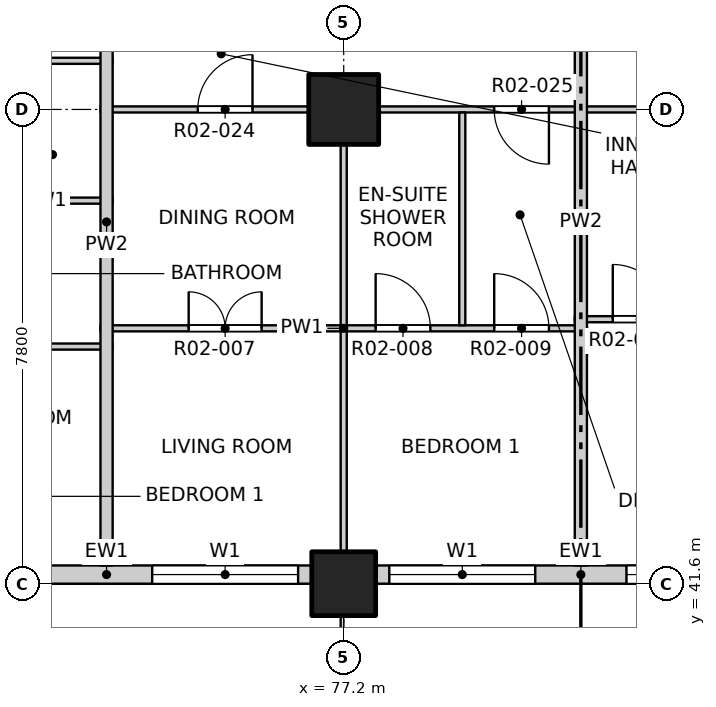
"""IFC4 building model, lengths in metres.
Left out: names, types, materials, properties, quantities, classifications, styles, units other than length and angle.
Written with IfcOpenShell. Run it as: python <this file> out.ifc"""

import sys

from ifc_helpers import new_model, si_unit, direction, frame, frame_2d, origin, origin_2d, place, context, subcontext, project, spatial, rectangle, extrude, element, fill, save


model = new_model("IFC4")
c1 = context("Model", 3, precision=1e-05, world=origin(), true_north=direction((0.0, 1.0)))
c2 = subcontext(c1, "Body", "Model", "MODEL_VIEW")
j1 = project(units=[si_unit("LENGTHUNIT", "METRE"), si_unit("PLANEANGLEUNIT", "RADIAN")], contexts=[c1])
p1 = place(None, origin())
s1 = spatial("IfcSite", under=j1, at=p1, CompositionType="ELEMENT")
p2 = place(p1, origin())
s2 = spatial("IfcBuilding", under=s1, at=p2, CompositionType="ELEMENT")
p3 = place(p2, frame((0.0, 0.0, 36.5)))
s3 = spatial("IfcBuildingStorey", under=s2, at=p3, CompositionType="ELEMENT", Elevation=36.5)
p4 = place(p3, frame((77.2, 41.6, -0.25), z_axis=(0.0, 0.0, 1.0), x_axis=(1.0, 0.0, 0.0)))
e1 = element("IfcColumn", 1, at=p4, inside=s3, PredefinedType="COLUMN", context=c2, shape_type="SweptSolid", body=[
    extrude(rectangle(XDim=1.05, YDim=1.05, at=origin_2d()), origin(), (0.0, 0.0, 1.0), 3.4),
])
p5 = place(p3, frame((77.2, 49.4, -0.25), z_axis=(0.0, 0.0, 1.0), x_axis=(1.0, 0.0, 0.0)))
e2 = element("IfcColumn", 2, at=p5, inside=s3, PredefinedType="COLUMN", context=c2, shape_type="SweptSolid", body=[
    extrude(rectangle(XDim=1.15, YDim=1.15, at=origin_2d()), origin(), (0.0, 0.0, 1.0), 3.4),
])
p6 = place(p3, frame((69.925, 41.75, 0.0), z_axis=(0.0, 0.0, 1.0), x_axis=(1.0, 0.0, 0.0)))
e3 = element("IfcWall", 3, at=p6, inside=s3, PredefinedType="SOLIDWALL", context=c2, shape_type="SweptSolid", body=[
    extrude(rectangle(XDim=6.75, YDim=0.3, at=frame_2d((3.375, 0.0))), origin(), (0.0, 0.0, 1.0), 2.7),
])
p7 = place(p6, frame((0.525, 0.0, 0.0)))
e4 = element("IfcOpeningElement", 4, at=p7, cuts=e3, PredefinedType="OPENING", context=c2, shape_type="SweptSolid", body=[
    extrude(rectangle(XDim=1.8, YDim=2.4, at=frame_2d((0.9, 1.2))), frame((0.0, 0.16, 0.0), z_axis=(0.0, -1.0, 0.0), x_axis=(1.0, 0.0, 0.0)), (0.0, 0.0, 1.0), 0.32),
])
p8 = place(p6, frame((4.125, 0.0, 0.9)))
e5 = element("IfcOpeningElement", 5, at=p8, cuts=e3, PredefinedType="OPENING", context=c2, shape_type="SweptSolid", body=[
    extrude(rectangle(XDim=2.4, YDim=1.8, at=frame_2d((1.2, 0.9))), frame((0.0, 0.16, 0.0), z_axis=(0.0, -1.0, 0.0), x_axis=(1.0, 0.0, 0.0)), (0.0, 0.0, 1.0), 0.32),
])
p9 = place(p3, frame((77.725, 41.75, 0.0), z_axis=(0.0, 0.0, 1.0), x_axis=(1.0, 0.0, 0.0)))
e6 = element("IfcWall", 6, at=p9, inside=s3, PredefinedType="SOLIDWALL", context=c2, shape_type="SweptSolid", body=[
    extrude(rectangle(XDim=6.75, YDim=0.3, at=frame_2d((3.375, 0.0))), origin(), (0.0, 0.0, 1.0), 2.7),
])
p10 = place(p9, frame((0.225, 0.0, 0.9)))
e7 = element("IfcOpeningElement", 7, at=p10, cuts=e6, PredefinedType="OPENING", context=c2, shape_type="SweptSolid", body=[
    extrude(rectangle(XDim=2.4, YDim=1.8, at=frame_2d((1.2, 0.9))), frame((0.0, 0.16, 0.0), z_axis=(0.0, -1.0, 0.0), x_axis=(1.0, 0.0, 0.0)), (0.0, 0.0, 1.0), 0.32),
])
p11 = place(p9, frame((4.125, 0.0, 0.9)))
e8 = element("IfcOpeningElement", 8, at=p11, cuts=e6, PredefinedType="OPENING", context=c2, shape_type="SweptSolid", body=[
    extrude(rectangle(XDim=2.4, YDim=1.8, at=frame_2d((1.2, 0.9))), frame((0.0, 0.16, 0.0), z_axis=(0.0, -1.0, 0.0), x_axis=(1.0, 0.0, 0.0)), (0.0, 0.0, 1.0), 0.32),
])
p12 = place(p3, frame((61.9, 45.5, 0.0), z_axis=(0.0, 0.0, 1.0), x_axis=(1.0, 0.0, 0.0)))
e9 = element("IfcWall", 9, at=p12, inside=s3, PredefinedType="PARTITIONING", context=c2, shape_type="SweptSolid", body=[
    extrude(rectangle(XDim=11.5, YDim=0.1, at=frame_2d((5.75, 0.0))), origin(), (0.0, 0.0, 1.0), 3.15),
])
p13 = place(p12, frame((7.965, 0.0, 0.0)))
e10 = element("IfcOpeningElement", 10, at=p13, cuts=e9, PredefinedType="OPENING", context=c2, shape_type="SweptSolid", body=[
    extrude(rectangle(XDim=0.9, YDim=2.1, at=frame_2d((0.45, 1.05))), frame((0.0, 0.06, 0.0), z_axis=(0.0, -1.0, 0.0), x_axis=(1.0, 0.0, 0.0)), (0.0, 0.0, 1.0), 0.12),
])
p14 = place(p3, frame((73.2, 45.8, 0.0), z_axis=(0.0, 0.0, 1.0), x_axis=(1.0, 0.0, 0.0)))
e11 = element("IfcWall", 11, at=p14, inside=s3, PredefinedType="PARTITIONING", context=c2, shape_type="SweptSolid", body=[
    extrude(rectangle(XDim=8.0, YDim=0.1, at=frame_2d((4.0, 0.0))), origin(), (0.0, 0.0, 1.0), 3.15),
])
p15 = place(p14, frame((1.45, 0.0, 0.0)))
e12 = element("IfcOpeningElement", 12, at=p15, cuts=e11, PredefinedType="OPENING", context=c2, shape_type="SweptSolid", body=[
    extrude(rectangle(XDim=1.2, YDim=2.1, at=frame_2d((0.6, 1.05))), frame((0.0, 0.06, 0.0), z_axis=(0.0, -1.0, 0.0), x_axis=(1.0, 0.0, 0.0)), (0.0, 0.0, 1.0), 0.12),
])
p16 = place(p14, frame((4.525, 0.0, 0.0)))
e13 = element("IfcOpeningElement", 13, at=p16, cuts=e11, PredefinedType="OPENING", context=c2, shape_type="SweptSolid", body=[
    extrude(rectangle(XDim=0.9, YDim=2.1, at=frame_2d((0.45, 1.05))), frame((0.0, 0.06, 0.0), z_axis=(0.0, -1.0, 0.0), x_axis=(1.0, 0.0, 0.0)), (0.0, 0.0, 1.0), 0.12),
])
p17 = place(p14, frame((6.475, 0.0, 0.0)))
e14 = element("IfcOpeningElement", 14, at=p17, cuts=e11, PredefinedType="OPENING", context=c2, shape_type="SweptSolid", body=[
    extrude(rectangle(XDim=0.9, YDim=2.1, at=frame_2d((0.45, 1.05))), frame((0.0, 0.06, 0.0), z_axis=(0.0, -1.0, 0.0), x_axis=(1.0, 0.0, 0.0)), (0.0, 0.0, 1.0), 0.12),
])
p18 = place(p3, frame((81.0, 45.95, 0.0), z_axis=(0.0, 0.0, 1.0), x_axis=(1.0, 0.0, 0.0)))
e15 = element("IfcWall", 15, at=p18, inside=s3, PredefinedType="PARTITIONING", context=c2, shape_type="SweptSolid", body=[
    extrude(rectangle(XDim=15.8, YDim=0.1, at=frame_2d((7.9, 0.0))), origin(), (0.0, 0.0, 1.0), 3.15),
])
p19 = place(p18, frame((0.625, 0.0, 0.0)))
e16 = element("IfcOpeningElement", 16, at=p19, cuts=e15, PredefinedType="OPENING", context=c2, shape_type="SweptSolid", body=[
    extrude(rectangle(XDim=0.9, YDim=2.1, at=frame_2d((0.45, 1.05))), frame((0.0, 0.06, 0.0), z_axis=(0.0, -1.0, 0.0), x_axis=(1.0, 0.0, 0.0)), (0.0, 0.0, 1.0), 0.12),
])
p20 = place(p18, frame((2.575, 0.0, 0.0)))
e17 = element("IfcOpeningElement", 17, at=p20, cuts=e15, PredefinedType="OPENING", context=c2, shape_type="SweptSolid", body=[
    extrude(rectangle(XDim=0.9, YDim=2.1, at=frame_2d((0.45, 1.05))), frame((0.0, 0.06, 0.0), z_axis=(0.0, -1.0, 0.0), x_axis=(1.0, 0.0, 0.0)), (0.0, 0.0, 1.0), 0.12),
])
p21 = place(p18, frame((5.35, 0.0, 0.0)))
e18 = element("IfcOpeningElement", 18, at=p21, cuts=e15, PredefinedType="OPENING", context=c2, shape_type="SweptSolid", body=[
    extrude(rectangle(XDim=1.2, YDim=2.1, at=frame_2d((0.6, 1.05))), frame((0.0, 0.06, 0.0), z_axis=(0.0, -1.0, 0.0), x_axis=(1.0, 0.0, 0.0)), (0.0, 0.0, 1.0), 0.12),
])
p22 = place(p18, frame((8.425, 0.0, 0.0)))
e19 = element("IfcOpeningElement", 19, at=p22, cuts=e15, PredefinedType="OPENING", context=c2, shape_type="SweptSolid", body=[
    extrude(rectangle(XDim=0.9, YDim=2.1, at=frame_2d((0.45, 1.05))), frame((0.0, 0.06, 0.0), z_axis=(0.0, -1.0, 0.0), x_axis=(1.0, 0.0, 0.0)), (0.0, 0.0, 1.0), 0.12),
])
p23 = place(p18, frame((10.375, 0.0, 0.0)))
e20 = element("IfcOpeningElement", 20, at=p23, cuts=e15, PredefinedType="OPENING", context=c2, shape_type="SweptSolid", body=[
    extrude(rectangle(XDim=0.9, YDim=2.1, at=frame_2d((0.45, 1.05))), frame((0.0, 0.06, 0.0), z_axis=(0.0, -1.0, 0.0), x_axis=(1.0, 0.0, 0.0)), (0.0, 0.0, 1.0), 0.12),
])
p24 = place(p18, frame((13.15, 0.0, 0.0)))
e21 = element("IfcOpeningElement", 21, at=p24, cuts=e15, PredefinedType="OPENING", context=c2, shape_type="SweptSolid", body=[
    extrude(rectangle(XDim=1.2, YDim=2.1, at=frame_2d((0.6, 1.05))), frame((0.0, 0.06, 0.0), z_axis=(0.0, -1.0, 0.0), x_axis=(1.0, 0.0, 0.0)), (0.0, 0.0, 1.0), 0.12),
])
p25 = place(p3, frame((71.18, 47.9, 0.0), z_axis=(0.0, 0.0, 1.0), x_axis=(1.0, 0.0, 0.0)))
e22 = element("IfcWall", 22, at=p25, inside=s3, PredefinedType="PARTITIONING", context=c2, shape_type="SweptSolid", body=[
    extrude(rectangle(XDim=2.22, YDim=0.1, at=frame_2d((1.11, 0.0))), origin(), (0.0, 0.0, 1.0), 3.15),
])
p26 = place(p3, frame((73.2, 49.4, 0.0), z_axis=(0.0, 0.0, 1.0), x_axis=(1.0, 0.0, 0.0)))
e23 = element("IfcWall", 23, at=p26, inside=s3, PredefinedType="PARTITIONING", context=c2, shape_type="SweptSolid", body=[
    extrude(rectangle(XDim=23.6, YDim=0.1, at=frame_2d((11.8, 0.0))), origin(), (0.0, 0.0, 1.0), 3.15),
])
p27 = place(p26, frame((1.6, 0.0, 0.0)))
e24 = element("IfcOpeningElement", 24, at=p27, cuts=e23, PredefinedType="OPENING", context=c2, shape_type="SweptSolid", body=[
    extrude(rectangle(XDim=0.9, YDim=2.1, at=frame_2d((0.45, 1.05))), frame((0.0, 0.06, 0.0), z_axis=(0.0, -1.0, 0.0), x_axis=(1.0, 0.0, 0.0)), (0.0, 0.0, 1.0), 0.12),
])
p28 = place(p26, frame((6.475, 0.0, 0.0)))
e25 = element("IfcOpeningElement", 25, at=p28, cuts=e23, PredefinedType="OPENING", context=c2, shape_type="SweptSolid", body=[
    extrude(rectangle(XDim=0.9, YDim=2.1, at=frame_2d((0.45, 1.05))), frame((0.0, 0.06, 0.0), z_axis=(0.0, -1.0, 0.0), x_axis=(1.0, 0.0, 0.0)), (0.0, 0.0, 1.0), 0.12),
])
p29 = place(p26, frame((10.2, 0.0, 0.0)))
e26 = element("IfcOpeningElement", 26, at=p29, cuts=e23, PredefinedType="OPENING", context=c2, shape_type="SweptSolid", body=[
    extrude(rectangle(XDim=0.9, YDim=2.1, at=frame_2d((0.45, 1.05))), frame((0.0, 0.06, 0.0), z_axis=(0.0, -1.0, 0.0), x_axis=(1.0, 0.0, 0.0)), (0.0, 0.0, 1.0), 0.12),
])
p30 = place(p26, frame((13.3, 0.0, 0.0)))
e27 = element("IfcOpeningElement", 27, at=p30, cuts=e23, PredefinedType="OPENING", context=c2, shape_type="SweptSolid", body=[
    extrude(rectangle(XDim=0.9, YDim=2.1, at=frame_2d((0.45, 1.05))), frame((0.0, 0.06, 0.0), z_axis=(0.0, -1.0, 0.0), x_axis=(1.0, 0.0, 0.0)), (0.0, 0.0, 1.0), 0.12),
])
p31 = place(p26, frame((18.0, 0.0, 0.0)))
e28 = element("IfcOpeningElement", 28, at=p31, cuts=e23, PredefinedType="OPENING", context=c2, shape_type="SweptSolid", body=[
    extrude(rectangle(XDim=0.9, YDim=2.1, at=frame_2d((0.45, 1.05))), frame((0.0, 0.06, 0.0), z_axis=(0.0, -1.0, 0.0), x_axis=(1.0, 0.0, 0.0)), (0.0, 0.0, 1.0), 0.12),
])
p32 = place(p26, frame((21.1, 0.0, 0.0)))
e29 = element("IfcOpeningElement", 29, at=p32, cuts=e23, PredefinedType="OPENING", context=c2, shape_type="SweptSolid", body=[
    extrude(rectangle(XDim=0.9, YDim=2.1, at=frame_2d((0.45, 1.05))), frame((0.0, 0.06, 0.0), z_axis=(0.0, -1.0, 0.0), x_axis=(1.0, 0.0, 0.0)), (0.0, 0.0, 1.0), 0.12),
])
p33 = place(p3, frame((71.18, 50.2, 0.0), z_axis=(0.0, 0.0, 1.0), x_axis=(1.0, 0.0, 0.0)))
e30 = element("IfcWall", 30, at=p33, inside=s3, PredefinedType="PARTITIONING", context=c2, shape_type="SweptSolid", body=[
    extrude(rectangle(XDim=2.22, YDim=0.1, at=frame_2d((1.11, 0.0))), origin(), (0.0, 0.0, 1.0), 3.15),
])
p34 = place(p3, frame((73.3, 41.9, 0.0), z_axis=(0.0, 0.0, 1.0), x_axis=(0.0, 1.0, 0.0)))
e31 = element("IfcWall", 31, at=p34, inside=s3, PredefinedType="PARTITIONING", context=c2, shape_type="SweptSolid", body=[
    extrude(rectangle(XDim=11.3, YDim=0.2, at=frame_2d((5.65, 0.0))), origin(), (0.0, 0.0, 1.0), 3.15),
])
p35 = place(p3, frame((77.2, 41.9, 0.0), z_axis=(0.0, 0.0, 1.0), x_axis=(0.0, 1.0, 0.0)))
e32 = element("IfcWall", 32, at=p35, inside=s3, PredefinedType="PARTITIONING", context=c2, shape_type="SweptSolid", body=[
    extrude(rectangle(XDim=7.45, YDim=0.1, at=frame_2d((3.725, 0.0))), origin(), (0.0, 0.0, 1.0), 2.55),
])
p36 = place(p3, frame((79.15, 45.85, 0.0), z_axis=(0.0, 0.0, 1.0), x_axis=(0.0, 1.0, 0.0)))
e33 = element("IfcWall", 33, at=p36, inside=s3, PredefinedType="PARTITIONING", context=c2, shape_type="SweptSolid", body=[
    extrude(rectangle(XDim=3.5, YDim=0.1, at=frame_2d((1.75, 0.0))), origin(), (0.0, 0.0, 1.0), 3.15),
])
p37 = place(p3, frame((81.1, 41.9, 0.0), z_axis=(0.0, 0.0, 1.0), x_axis=(0.0, 1.0, 0.0)))
e34 = element("IfcWall", 34, at=p37, inside=s3, PredefinedType="PARTITIONING", context=c2, shape_type="SweptSolid", body=[
    extrude(rectangle(XDim=11.3, YDim=0.2, at=frame_2d((5.65, 0.0))), origin(), (0.0, 0.0, 1.0), 3.15),
])
p38 = place(p8, origin())
e35 = element("IfcWindow", 35, at=p38, inside=s3, PartitioningType="DOUBLE_PANEL_VERTICAL", PredefinedType="WINDOW", context=c2, shape_type="SweptSolid", body=[
    extrude(rectangle(XDim=2.4, YDim=1.8, at=frame_2d((1.2, 0.9))), frame((0.0, 0.03, 0.0), z_axis=(0.0, -1.0, 0.0), x_axis=(1.0, 0.0, 0.0)), (0.0, 0.0, 1.0), 0.06),
])
fill(e5, e35)
p39 = place(p10, origin())
e36 = element("IfcWindow", 36, at=p39, inside=s3, PartitioningType="DOUBLE_PANEL_VERTICAL", PredefinedType="WINDOW", context=c2, shape_type="SweptSolid", body=[
    extrude(rectangle(XDim=2.4, YDim=1.8, at=frame_2d((1.2, 0.9))), frame((0.0, 0.03, 0.0), z_axis=(0.0, -1.0, 0.0), x_axis=(1.0, 0.0, 0.0)), (0.0, 0.0, 1.0), 0.06),
])
fill(e7, e36)
p40 = place(p11, origin())
e37 = element("IfcWindow", 37, at=p40, inside=s3, PartitioningType="DOUBLE_PANEL_VERTICAL", PredefinedType="WINDOW", context=c2, shape_type="SweptSolid", body=[
    extrude(rectangle(XDim=2.4, YDim=1.8, at=frame_2d((1.2, 0.9))), frame((0.0, 0.03, 0.0), z_axis=(0.0, -1.0, 0.0), x_axis=(1.0, 0.0, 0.0)), (0.0, 0.0, 1.0), 0.06),
])
fill(e8, e37)
p41 = place(p15, origin())
e38 = element("IfcDoor", 38, at=p41, inside=s3, OperationType="DOUBLE_DOOR_SINGLE_SWING", PredefinedType="DOOR", context=c2, shape_type="SweptSolid", body=[
    extrude(rectangle(XDim=1.2, YDim=2.1, at=frame_2d((0.6, 1.05))), frame((0.0, 0.025, 0.0), z_axis=(0.0, -1.0, 0.0), x_axis=(1.0, 0.0, 0.0)), (0.0, 0.0, 1.0), 0.05),
])
fill(e12, e38)
p42 = place(p16, origin())
e39 = element("IfcDoor", 39, at=p42, inside=s3, OperationType="SINGLE_SWING_LEFT", PredefinedType="DOOR", context=c2, shape_type="SweptSolid", body=[
    extrude(rectangle(XDim=0.9, YDim=2.1, at=frame_2d((0.45, 1.05))), frame((0.0, 0.025, 0.0), z_axis=(0.0, -1.0, 0.0), x_axis=(1.0, 0.0, 0.0)), (0.0, 0.0, 1.0), 0.05),
])
fill(e13, e39)
p43 = place(p17, origin())
e40 = element("IfcDoor", 40, at=p43, inside=s3, OperationType="SINGLE_SWING_LEFT", PredefinedType="DOOR", context=c2, shape_type="SweptSolid", body=[
    extrude(rectangle(XDim=0.9, YDim=2.1, at=frame_2d((0.45, 1.05))), frame((0.0, 0.025, 0.0), z_axis=(0.0, -1.0, 0.0), x_axis=(1.0, 0.0, 0.0)), (0.0, 0.0, 1.0), 0.05),
])
fill(e14, e40)
p44 = place(p19, origin())
e41 = element("IfcDoor", 41, at=p44, inside=s3, OperationType="SINGLE_SWING_LEFT", PredefinedType="DOOR", context=c2, shape_type="SweptSolid", body=[
    extrude(rectangle(XDim=0.9, YDim=2.1, at=frame_2d((0.45, 1.05))), frame((0.0, 0.025, 0.0), z_axis=(0.0, -1.0, 0.0), x_axis=(1.0, 0.0, 0.0)), (0.0, 0.0, 1.0), 0.05),
])
fill(e16, e41)
p45 = place(p27, origin())
e42 = element("IfcDoor", 42, at=p45, inside=s3, OperationType="SINGLE_SWING_RIGHT", PredefinedType="DOOR", context=c2, shape_type="SweptSolid", body=[
    extrude(rectangle(XDim=0.9, YDim=2.1, at=frame_2d((0.45, 1.05))), frame((0.0, 0.025, 0.0), z_axis=(0.0, -1.0, 0.0), x_axis=(1.0, 0.0, 0.0)), (0.0, 0.0, 1.0), 0.05),
])
fill(e24, e42)
p46 = place(p28, origin())
e43 = element("IfcDoor", 43, at=p46, inside=s3, OperationType="SINGLE_SWING_LEFT", PredefinedType="DOOR", context=c2, shape_type="SweptSolid", body=[
    extrude(rectangle(XDim=0.9, YDim=2.1, at=frame_2d((0.45, 1.05))), frame((0.0, 0.025, 0.0), z_axis=(0.0, -1.0, 0.0), x_axis=(1.0, 0.0, 0.0)), (0.0, 0.0, 1.0), 0.05),
])
fill(e25, e43)
save(model, sys.argv[1])
